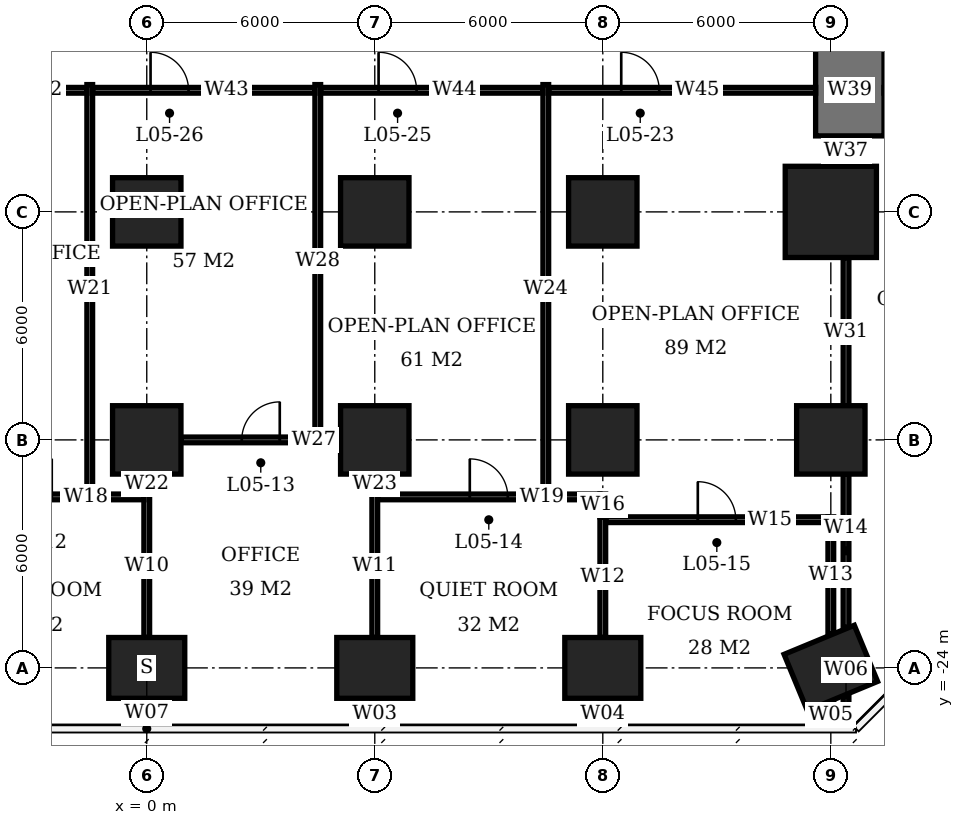
"""IFC4 building model, lengths in metres.
Left out: names, types, materials, properties, quantities, classifications, styles, units other than length and angle.
Written with IfcOpenShell. Run it as: python <this file> out.ifc"""

import sys

from ifc_helpers import new_model, si_unit, direction, frame, frame_2d, origin, origin_2d, place, context, subcontext, project, spatial, rectangle, extrude, element, fill, save


model = new_model("IFC4")
c1 = context("Model", 3, precision=1e-05, world=origin(), true_north=direction((0.0, 1.0)))
c2 = subcontext(c1, "Body", "Model", "MODEL_VIEW")
j1 = project(units=[si_unit("LENGTHUNIT", "METRE"), si_unit("PLANEANGLEUNIT", "RADIAN")], contexts=[c1])
p1 = place(None, origin())
s1 = spatial("IfcSite", under=j1, at=p1, CompositionType="ELEMENT")
p2 = place(p1, origin())
s2 = spatial("IfcBuilding", under=s1, at=p2, CompositionType="ELEMENT")
p3 = place(p2, frame((0.0, 0.0, 26.0)))
s3 = spatial("IfcBuildingStorey", under=s2, at=p3, CompositionType="ELEMENT", Elevation=26.0)
p4 = place(p3, frame((0.0, -24.0, 0.0), z_axis=(0.0, 0.0, 1.0), x_axis=(1.0, 0.0, 0.0)))
e1 = element("IfcColumn", 1, at=p4, inside=s3, PredefinedType="COLUMN", context=c2, shape_type="SweptSolid", body=[
    extrude(rectangle(XDim=2.0, YDim=1.6, at=origin_2d()), origin(), (0.0, 0.0, 1.0), 3.9),
])
for number, where, z_axis, x_axis in (
    (2, (0.0, -18.0, 0.0), (0.0, 0.0, 1.0), (1.0, 0.0, 0.0)),
    (3, (0.0, -12.0, 0.0), (0.0, 0.0, 1.0), (1.0, 0.0, 0.0)),
):
    element("IfcColumn", number, at=place(p3, frame(where, z_axis=z_axis, x_axis=x_axis)), inside=s3, PredefinedType="COLUMN", context=c2, shape_type="SweptSolid", body=[
        extrude(rectangle(XDim=1.8, YDim=1.8, at=origin_2d()), origin(), (0.0, 0.0, 1.0), 3.9),
    ])
p5 = place(p3, frame((6.0, -24.0, 0.0), z_axis=(0.0, 0.0, 1.0), x_axis=(1.0, 0.0, 0.0)))
e4 = element("IfcColumn", 4, at=p5, inside=s3, PredefinedType="COLUMN", context=c2, shape_type="SweptSolid", body=[
    extrude(rectangle(XDim=2.0, YDim=1.6, at=origin_2d()), origin(), (0.0, 0.0, 1.0), 3.9),
])
for number, where, z_axis, x_axis in (
    (5, (6.0, -18.0, 0.0), (0.0, 0.0, 1.0), (1.0, 0.0, 0.0)),
    (6, (6.0, -12.0, 0.0), (0.0, 0.0, 1.0), (1.0, 0.0, 0.0)),
):
    element("IfcColumn", number, at=place(p3, frame(where, z_axis=z_axis, x_axis=x_axis)), inside=s3, PredefinedType="COLUMN", context=c2, shape_type="SweptSolid", body=[
        extrude(rectangle(XDim=1.8, YDim=1.8, at=origin_2d()), origin(), (0.0, 0.0, 1.0), 3.9),
    ])
p6 = place(p3, frame((12.0, -24.0, 0.0), z_axis=(0.0, 0.0, 1.0), x_axis=(1.0, 0.0, 0.0)))
e7 = element("IfcColumn", 7, at=p6, inside=s3, PredefinedType="COLUMN", context=c2, shape_type="SweptSolid", body=[
    extrude(rectangle(XDim=2.0, YDim=1.6, at=origin_2d()), origin(), (0.0, 0.0, 1.0), 3.9),
])
for number, where, z_axis, x_axis in (
    (8, (12.0, -18.0, 0.0), (0.0, 0.0, 1.0), (1.0, 0.0, 0.0)),
    (9, (12.0, -12.0, 0.0), (0.0, 0.0, 1.0), (1.0, 0.0, 0.0)),
):
    element("IfcColumn", number, at=place(p3, frame(where, z_axis=z_axis, x_axis=x_axis)), inside=s3, PredefinedType="COLUMN", context=c2, shape_type="SweptSolid", body=[
        extrude(rectangle(XDim=1.8, YDim=1.8, at=origin_2d()), origin(), (0.0, 0.0, 1.0), 3.9),
    ])
p7 = place(p3, frame((18.0, -24.0, 0.0), z_axis=(0.0, 0.0, 1.0), x_axis=(-0.923879532511, -0.382683432365, 0.0)))
e10 = element("IfcColumn", 10, at=p7, inside=s3, PredefinedType="COLUMN", context=c2, shape_type="SweptSolid", body=[
    extrude(rectangle(XDim=2.0, YDim=1.6, at=origin_2d()), origin(), (0.0, 0.0, 1.0), 3.9),
])
p8 = place(p3, frame((18.0, -18.0, 0.0), z_axis=(0.0, 0.0, 1.0), x_axis=(1.0, 0.0, 0.0)))
e11 = element("IfcColumn", 11, at=p8, inside=s3, PredefinedType="COLUMN", context=c2, shape_type="SweptSolid", body=[
    extrude(rectangle(XDim=1.8, YDim=1.8, at=origin_2d()), origin(), (0.0, 0.0, 1.0), 3.9),
])
p9 = place(p3, frame((18.0, -12.0, 0.0), z_axis=(0.0, 0.0, 1.0), x_axis=(1.0, 0.0, 0.0)))
e12 = element("IfcColumn", 12, at=p9, inside=s3, PredefinedType="COLUMN", context=c2, shape_type="SweptSolid", body=[
    extrude(rectangle(XDim=2.4, YDim=2.4, at=origin_2d()), origin(), (0.0, 0.0, 1.0), 3.9),
])
p10 = place(p3, frame((18.5, -10.0, 0.0), z_axis=(0.0, 0.0, 1.0), x_axis=(0.0, 1.0, 0.0)))
e13 = element("IfcWall", 13, at=p10, inside=s3, PredefinedType="SHEAR", context=c2, shape_type="SweptSolid", body=[
    extrude(rectangle(XDim=2.4, YDim=1.8, at=frame_2d((1.2, 0.0))), origin(), (0.0, 0.0, 1.0), 3.9),
])
p11 = place(p3, frame((12.075, -20.1, 0.0), z_axis=(0.0, 0.0, 1.0), x_axis=(1.0, 0.0, 0.0)))
e14 = element("IfcWall", 14, at=p11, inside=s3, PredefinedType="PARTITIONING", context=c2, shape_type="SweptSolid", body=[
    extrude(rectangle(XDim=5.85, YDim=0.15, at=frame_2d((2.925, 0.0))), origin(), (0.0, 0.0, 1.0), 3.65),
])
p12 = place(p11, frame((2.425, 0.0, 0.0)))
e15 = element("IfcOpeningElement", 15, at=p12, cuts=e14, PredefinedType="OPENING", context=c2, shape_type="SweptSolid", body=[
    extrude(rectangle(XDim=1.0, YDim=2.1, at=frame_2d((0.5, 1.05))), frame((0.0, 0.085, 0.0), z_axis=(0.0, -1.0, 0.0), x_axis=(1.0, 0.0, 0.0)), (0.0, 0.0, 1.0), 0.17),
])
p13 = place(p3, frame((-5.925, -19.5, 0.0), z_axis=(0.0, 0.0, 1.0), x_axis=(1.0, 0.0, 0.0)))
e16 = element("IfcWall", 16, at=p13, inside=s3, PredefinedType="PARTITIONING", context=c2, shape_type="SweptSolid", body=[
    extrude(rectangle(XDim=5.85, YDim=0.15, at=frame_2d((2.925, 0.0))), origin(), (0.0, 0.0, 1.0), 3.65),
])
p14 = place(p13, frame((2.425, 0.0, 0.0)))
e17 = element("IfcOpeningElement", 17, at=p14, cuts=e16, PredefinedType="OPENING", context=c2, shape_type="SweptSolid", body=[
    extrude(rectangle(XDim=1.0, YDim=2.1, at=frame_2d((0.5, 1.05))), frame((0.0, 0.085, 0.0), z_axis=(0.0, -1.0, 0.0), x_axis=(1.0, 0.0, 0.0)), (0.0, 0.0, 1.0), 0.17),
])
p15 = place(p3, frame((6.075, -19.5, 0.0), z_axis=(0.0, 0.0, 1.0), x_axis=(1.0, 0.0, 0.0)))
e18 = element("IfcWall", 18, at=p15, inside=s3, PredefinedType="PARTITIONING", context=c2, shape_type="SweptSolid", body=[
    extrude(rectangle(XDim=5.85, YDim=0.15, at=frame_2d((2.925, 0.0))), origin(), (0.0, 0.0, 1.0), 3.65),
])
p16 = place(p15, frame((2.425, 0.0, 0.0)))
e19 = element("IfcOpeningElement", 19, at=p16, cuts=e18, PredefinedType="OPENING", context=c2, shape_type="SweptSolid", body=[
    extrude(rectangle(XDim=1.0, YDim=2.1, at=frame_2d((0.5, 1.05))), frame((0.0, 0.085, 0.0), z_axis=(0.0, -1.0, 0.0), x_axis=(1.0, 0.0, 0.0)), (0.0, 0.0, 1.0), 0.17),
])
p17 = place(p3, frame((0.9, -18.0, 0.0), z_axis=(0.0, 0.0, 1.0), x_axis=(1.0, 0.0, 0.0)))
e20 = element("IfcWall", 20, at=p17, inside=s3, PredefinedType="PARTITIONING", context=c2, shape_type="SweptSolid", body=[
    extrude(rectangle(XDim=4.2, YDim=0.15, at=frame_2d((2.1, 0.0))), origin(), (0.0, 0.0, 1.0), 3.65),
])
p18 = place(p17, frame((1.6, 0.0, 0.0)))
e21 = element("IfcOpeningElement", 21, at=p18, cuts=e20, PredefinedType="OPENING", context=c2, shape_type="SweptSolid", body=[
    extrude(rectangle(XDim=1.0, YDim=2.1, at=frame_2d((0.5, 1.05))), frame((0.0, 0.085, 0.0), z_axis=(0.0, -1.0, 0.0), x_axis=(1.0, 0.0, 0.0)), (0.0, 0.0, 1.0), 0.17),
])
p19 = place(p3, frame((0.0, -25.55, 0.0), z_axis=(0.0, 0.0, 1.0), x_axis=(0.0, 1.0, 0.0)))
e22 = element("IfcWall", 22, at=p19, inside=s3, PredefinedType="PARTITIONING", context=c2, shape_type="SweptSolid", body=[
    extrude(rectangle(XDim=0.75, YDim=0.15, at=frame_2d((0.375, 0.0))), origin(), (0.0, 0.0, 1.0), 3.65),
])
p20 = place(p3, frame((0.0, -23.2, 0.0), z_axis=(0.0, 0.0, 1.0), x_axis=(0.0, 1.0, 0.0)))
e23 = element("IfcWall", 23, at=p20, inside=s3, PredefinedType="PARTITIONING", context=c2, shape_type="SweptSolid", body=[
    extrude(rectangle(XDim=3.775, YDim=0.15, at=frame_2d((1.887, 0.0))), origin(), (0.0, 0.0, 1.0), 3.65),
])
p21 = place(p3, frame((0.0, -19.425, 0.0), z_axis=(0.0, 0.0, 1.0), x_axis=(0.0, 1.0, 0.0)))
e24 = element("IfcWall", 24, at=p21, inside=s3, PredefinedType="PARTITIONING", context=c2, shape_type="SweptSolid", body=[
    extrude(rectangle(XDim=0.525, YDim=0.15, at=frame_2d((0.263, 0.0))), origin(), (0.0, 0.0, 1.0), 3.65),
])
p22 = place(p3, frame((6.0, -25.6, 0.0), z_axis=(0.0, 0.0, 1.0), x_axis=(0.0, 1.0, 0.0)))
e25 = element("IfcWall", 25, at=p22, inside=s3, PredefinedType="PARTITIONING", context=c2, shape_type="SweptSolid", body=[
    extrude(rectangle(XDim=0.8, YDim=0.15, at=frame_2d((0.4, 0.0))), origin(), (0.0, 0.0, 1.0), 3.65),
])
p23 = place(p3, frame((6.0, -23.2, 0.0), z_axis=(0.0, 0.0, 1.0), x_axis=(0.0, 1.0, 0.0)))
e26 = element("IfcWall", 26, at=p23, inside=s3, PredefinedType="PARTITIONING", context=c2, shape_type="SweptSolid", body=[
    extrude(rectangle(XDim=3.775, YDim=0.15, at=frame_2d((1.887, 0.0))), origin(), (0.0, 0.0, 1.0), 3.65),
])
p24 = place(p3, frame((6.0, -19.425, 0.0), z_axis=(0.0, 0.0, 1.0), x_axis=(0.0, 1.0, 0.0)))
e27 = element("IfcWall", 27, at=p24, inside=s3, PredefinedType="PARTITIONING", context=c2, shape_type="SweptSolid", body=[
    extrude(rectangle(XDim=0.525, YDim=0.15, at=frame_2d((0.263, 0.0))), origin(), (0.0, 0.0, 1.0), 3.65),
])
p25 = place(p3, frame((12.0, -25.6, 0.0), z_axis=(0.0, 0.0, 1.0), x_axis=(0.0, 1.0, 0.0)))
e28 = element("IfcWall", 28, at=p25, inside=s3, PredefinedType="PARTITIONING", context=c2, shape_type="SweptSolid", body=[
    extrude(rectangle(XDim=0.8, YDim=0.15, at=frame_2d((0.4, 0.0))), origin(), (0.0, 0.0, 1.0), 3.65),
])
p26 = place(p3, frame((12.0, -23.2, 0.0), z_axis=(0.0, 0.0, 1.0), x_axis=(0.0, 1.0, 0.0)))
e29 = element("IfcWall", 29, at=p26, inside=s3, PredefinedType="PARTITIONING", context=c2, shape_type="SweptSolid", body=[
    extrude(rectangle(XDim=3.175, YDim=0.15, at=frame_2d((1.587, 0.0))), origin(), (0.0, 0.0, 1.0), 3.65),
])
p27 = place(p3, frame((12.0, -20.025, 0.0), z_axis=(0.0, 0.0, 1.0), x_axis=(0.0, 1.0, 0.0)))
e30 = element("IfcWall", 30, at=p27, inside=s3, PredefinedType="PARTITIONING", context=c2, shape_type="SweptSolid", body=[
    extrude(rectangle(XDim=0.6, YDim=0.15, at=frame_2d((0.3, 0.0))), origin(), (0.0, 0.0, 1.0), 3.65),
])
p28 = place(p3, frame((18.0, -25.6, 0.0), z_axis=(0.0, 0.0, 1.0), x_axis=(0.0, 1.0, 0.0)))
e31 = element("IfcWall", 31, at=p28, inside=s3, PredefinedType="PARTITIONING", context=c2, shape_type="SweptSolid", body=[
    extrude(rectangle(XDim=0.703, YDim=0.15, at=frame_2d((0.352, 0.0))), origin(), (0.0, 0.0, 1.0), 3.65),
])
p29 = place(p3, frame((18.0, -23.103, 0.0), z_axis=(0.0, 0.0, 1.0), x_axis=(0.0, 1.0, 0.0)))
e32 = element("IfcWall", 32, at=p29, inside=s3, PredefinedType="PARTITIONING", context=c2, shape_type="SweptSolid", body=[
    extrude(rectangle(XDim=3.078, YDim=0.15, at=frame_2d((1.539, 0.0))), origin(), (0.0, 0.0, 1.0), 3.65),
])
p30 = place(p3, frame((-5.6, -8.8, 0.0), z_axis=(0.0, 0.0, 1.0), x_axis=(1.0, 0.0, 0.0)))
e33 = element("IfcWall", 33, at=p30, inside=s3, PredefinedType="PARTITIONING", context=c2, shape_type="SweptSolid", body=[
    extrude(rectangle(XDim=4.025, YDim=0.15, at=frame_2d((2.013, 0.0))), origin(), (0.0, 0.0, 1.0), 3.65),
])
p31 = place(p30, frame((0.935, 0.0, 0.0)))
e34 = element("IfcOpeningElement", 34, at=p31, cuts=e33, PredefinedType="OPENING", context=c2, shape_type="SweptSolid", body=[
    extrude(rectangle(XDim=1.0, YDim=2.1, at=frame_2d((0.5, 1.05))), frame((0.0, 0.085, 0.0), z_axis=(0.0, -1.0, 0.0), x_axis=(1.0, 0.0, 0.0)), (0.0, 0.0, 1.0), 0.17),
])
p32 = place(p3, frame((-1.5, -19.425, 0.0), z_axis=(0.0, 0.0, 1.0), x_axis=(0.0, 1.0, 0.0)))
e35 = element("IfcWall", 35, at=p32, inside=s3, PredefinedType="PARTITIONING", context=c2, shape_type="SweptSolid", body=[
    extrude(rectangle(XDim=10.775, YDim=0.15, at=frame_2d((5.388, 0.0))), origin(), (0.0, 0.0, 1.0), 3.65),
])
p33 = place(p3, frame((-1.425, -8.8, 0.0), z_axis=(0.0, 0.0, 1.0), x_axis=(1.0, 0.0, 0.0)))
e36 = element("IfcWall", 36, at=p33, inside=s3, PredefinedType="PARTITIONING", context=c2, shape_type="SweptSolid", body=[
    extrude(rectangle(XDim=5.85, YDim=0.15, at=frame_2d((2.925, 0.0))), origin(), (0.0, 0.0, 1.0), 3.65),
])
p34 = place(p33, frame((1.525, 0.0, 0.0)))
e37 = element("IfcOpeningElement", 37, at=p34, cuts=e36, PredefinedType="OPENING", context=c2, shape_type="SweptSolid", body=[
    extrude(rectangle(XDim=1.0, YDim=2.1, at=frame_2d((0.5, 1.05))), frame((0.0, 0.085, 0.0), z_axis=(0.0, -1.0, 0.0), x_axis=(1.0, 0.0, 0.0)), (0.0, 0.0, 1.0), 0.17),
])
p35 = place(p3, frame((4.5, -17.925, 0.0), z_axis=(0.0, 0.0, 1.0), x_axis=(0.0, 1.0, 0.0)))
e38 = element("IfcWall", 38, at=p35, inside=s3, PredefinedType="PARTITIONING", context=c2, shape_type="SweptSolid", body=[
    extrude(rectangle(XDim=9.275, YDim=0.15, at=frame_2d((4.638, 0.0))), origin(), (0.0, 0.0, 1.0), 3.65),
])
p36 = place(p3, frame((4.575, -8.8, 0.0), z_axis=(0.0, 0.0, 1.0), x_axis=(1.0, 0.0, 0.0)))
e39 = element("IfcWall", 39, at=p36, inside=s3, PredefinedType="PARTITIONING", context=c2, shape_type="SweptSolid", body=[
    extrude(rectangle(XDim=5.85, YDim=0.15, at=frame_2d((2.925, 0.0))), origin(), (0.0, 0.0, 1.0), 3.65),
])
p37 = place(p36, frame((1.525, 0.0, 0.0)))
e40 = element("IfcOpeningElement", 40, at=p37, cuts=e39, PredefinedType="OPENING", context=c2, shape_type="SweptSolid", body=[
    extrude(rectangle(XDim=1.0, YDim=2.1, at=frame_2d((0.5, 1.05))), frame((0.0, 0.085, 0.0), z_axis=(0.0, -1.0, 0.0), x_axis=(1.0, 0.0, 0.0)), (0.0, 0.0, 1.0), 0.17),
])
p38 = place(p3, frame((10.5, -19.425, 0.0), z_axis=(0.0, 0.0, 1.0), x_axis=(0.0, 1.0, 0.0)))
e41 = element("IfcWall", 41, at=p38, inside=s3, PredefinedType="PARTITIONING", context=c2, shape_type="SweptSolid", body=[
    extrude(rectangle(XDim=10.775, YDim=0.15, at=frame_2d((5.388, 0.0))), origin(), (0.0, 0.0, 1.0), 3.65),
])
p39 = place(p3, frame((10.575, -8.8, 0.0), z_axis=(0.0, 0.0, 1.0), x_axis=(1.0, 0.0, 0.0)))
e42 = element("IfcWall", 42, at=p39, inside=s3, PredefinedType="PARTITIONING", context=c2, shape_type="SweptSolid", body=[
    extrude(rectangle(XDim=7.025, YDim=0.15, at=frame_2d((3.513, 0.0))), origin(), (0.0, 0.0, 1.0), 3.65),
])
p40 = place(p39, frame((1.91, 0.0, 0.0)))
e43 = element("IfcOpeningElement", 43, at=p40, cuts=e42, PredefinedType="OPENING", context=c2, shape_type="SweptSolid", body=[
    extrude(rectangle(XDim=1.0, YDim=2.1, at=frame_2d((0.5, 1.05))), frame((0.0, 0.085, 0.0), z_axis=(0.0, -1.0, 0.0), x_axis=(1.0, 0.0, 0.0)), (0.0, 0.0, 1.0), 0.17),
])
p41 = place(p3, frame((18.4, -25.6, 0.0), z_axis=(0.0, 0.0, 1.0), x_axis=(0.0, 1.0, 0.0)))
e44 = element("IfcWall", 44, at=p41, inside=s3, PredefinedType="PARTITIONING", context=c2, shape_type="SweptSolid", body=[
    extrude(rectangle(XDim=0.869, YDim=0.15, at=frame_2d((0.435, 0.0))), origin(), (0.0, 0.0, 1.0), 3.65),
])
p42 = place(p3, frame((18.4, -22.937, 0.0), z_axis=(0.0, 0.0, 1.0), x_axis=(0.0, 1.0, 0.0)))
e45 = element("IfcWall", 45, at=p42, inside=s3, PredefinedType="PARTITIONING", context=c2, shape_type="SweptSolid", body=[
    extrude(rectangle(XDim=4.037, YDim=0.15, at=frame_2d((2.019, 0.0))), origin(), (0.0, 0.0, 1.0), 3.65),
])
p43 = place(p3, frame((18.4, -17.1, 0.0), z_axis=(0.0, 0.0, 1.0), x_axis=(0.0, 1.0, 0.0)))
e46 = element("IfcWall", 46, at=p43, inside=s3, PredefinedType="PARTITIONING", context=c2, shape_type="SweptSolid", body=[
    extrude(rectangle(XDim=3.9, YDim=0.15, at=frame_2d((1.95, 0.0))), origin(), (0.0, 0.0, 1.0), 3.65),
])
p44 = place(p3, frame((18.4, -10.8, 0.0), z_axis=(0.0, 0.0, 1.0), x_axis=(0.0, 1.0, 0.0)))
e47 = element("IfcWall", 47, at=p44, inside=s3, PredefinedType="PARTITIONING", context=c2, shape_type="SweptSolid", body=[
    extrude(rectangle(XDim=0.8, YDim=0.15, at=frame_2d((0.4, 0.0))), origin(), (0.0, 0.0, 1.0), 3.65),
])
p45 = place(p18, origin())
e48 = element("IfcDoor", 48, at=p45, inside=s3, OperationType="SINGLE_SWING_RIGHT", PredefinedType="DOOR", context=c2, shape_type="SweptSolid", body=[
    extrude(rectangle(XDim=1.0, YDim=2.1, at=frame_2d((0.5, 1.05))), frame((0.0, 0.025, 0.0), z_axis=(0.0, -1.0, 0.0), x_axis=(1.0, 0.0, 0.0)), (0.0, 0.0, 1.0), 0.05),
])
fill(e21, e48)
p46 = place(p16, origin())
e49 = element("IfcDoor", 49, at=p46, inside=s3, OperationType="SINGLE_SWING_LEFT", PredefinedType="DOOR", context=c2, shape_type="SweptSolid", body=[
    extrude(rectangle(XDim=1.0, YDim=2.1, at=frame_2d((0.5, 1.05))), frame((0.0, 0.025, 0.0), z_axis=(0.0, -1.0, 0.0), x_axis=(1.0, 0.0, 0.0)), (0.0, 0.0, 1.0), 0.05),
])
fill(e19, e49)
p47 = place(p12, origin())
e50 = element("IfcDoor", 50, at=p47, inside=s3, OperationType="SINGLE_SWING_LEFT", PredefinedType="DOOR", context=c2, shape_type="SweptSolid", body=[
    extrude(rectangle(XDim=1.0, YDim=2.1, at=frame_2d((0.5, 1.05))), frame((0.0, 0.025, 0.0), z_axis=(0.0, -1.0, 0.0), x_axis=(1.0, 0.0, 0.0)), (0.0, 0.0, 1.0), 0.05),
])
fill(e15, e50)
p48 = place(p40, origin())
e51 = element("IfcDoor", 51, at=p48, inside=s3, OperationType="SINGLE_SWING_LEFT", PredefinedType="DOOR", context=c2, shape_type="SweptSolid", body=[
    extrude(rectangle(XDim=1.0, YDim=2.1, at=frame_2d((0.5, 1.05))), frame((0.0, 0.025, 0.0), z_axis=(0.0, -1.0, 0.0), x_axis=(1.0, 0.0, 0.0)), (0.0, 0.0, 1.0), 0.05),
])
fill(e43, e51)
p49 = place(p37, origin())
e52 = element("IfcDoor", 52, at=p49, inside=s3, OperationType="SINGLE_SWING_LEFT", PredefinedType="DOOR", context=c2, shape_type="SweptSolid", body=[
    extrude(rectangle(XDim=1.0, YDim=2.1, at=frame_2d((0.5, 1.05))), frame((0.0, 0.025, 0.0), z_axis=(0.0, -1.0, 0.0), x_axis=(1.0, 0.0, 0.0)), (0.0, 0.0, 1.0), 0.05),
])
fill(e40, e52)
p50 = place(p34, origin())
e53 = element("IfcDoor", 53, at=p50, inside=s3, OperationType="SINGLE_SWING_LEFT", PredefinedType="DOOR", context=c2, shape_type="SweptSolid", body=[
    extrude(rectangle(XDim=1.0, YDim=2.1, at=frame_2d((0.5, 1.05))), frame((0.0, 0.025, 0.0), z_axis=(0.0, -1.0, 0.0), x_axis=(1.0, 0.0, 0.0)), (0.0, 0.0, 1.0), 0.05),
])
fill(e37, e53)
save(model, sys.argv[1])
